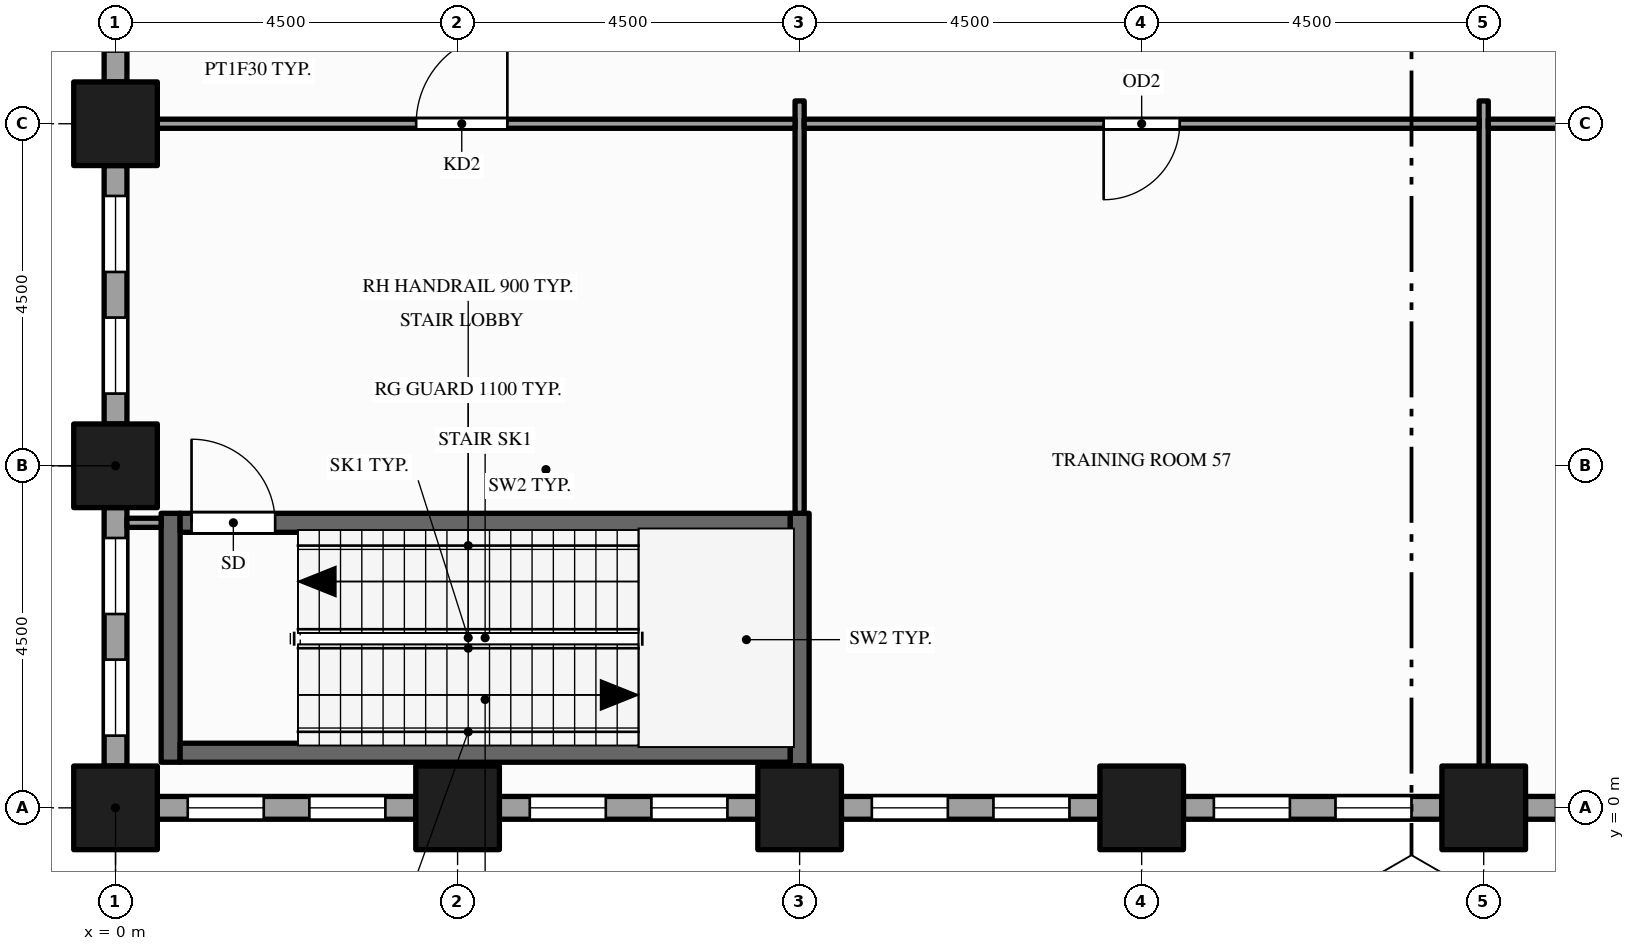
"""IFC4 building model, lengths in metres.
Left out: names, types, materials, properties, quantities, classifications, styles, units other than length and angle.
Written with IfcOpenShell. Run it as: python <this file> out.ifc"""

import sys

from ifc_helpers import new_model, si_unit, direction, frame, frame_2d, origin, origin_2d, place, context, subcontext, project, spatial, rectangle, hollow_rectangle, extrude, element, fill, save


model = new_model("IFC4")
c1 = context("Model", 3, precision=1e-05, world=origin(), true_north=direction((0.0, 1.0)))
c2 = subcontext(c1, "Body", "Model", "MODEL_VIEW")
j1 = project(units=[si_unit("LENGTHUNIT", "METRE"), si_unit("PLANEANGLEUNIT", "RADIAN")], contexts=[c1])
p1 = place(None, origin())
s1 = spatial("IfcSite", under=j1, at=p1, CompositionType="ELEMENT")
p2 = place(p1, origin())
s2 = spatial("IfcBuilding", under=s1, at=p2, CompositionType="ELEMENT")
p3 = place(p2, frame((0.0, 0.0, 8.0)))
s3 = spatial("IfcBuildingStorey", under=s2, at=p3, CompositionType="ELEMENT", Elevation=8.0)
for number, where, z_axis, x_axis in (
    (1, (0.0, 0.0, -0.25), (0.0, 0.0, 1.0), (1.0, 0.0, 0.0)),
    (2, (0.0, 4.5, -0.25), (0.0, 0.0, 1.0), (1.0, 0.0, 0.0)),
    (3, (0.0, 9.0, -0.25), (0.0, 0.0, 1.0), (1.0, 0.0, 0.0)),
    (4, (4.5, 0.0, -0.25), (0.0, 0.0, 1.0), (1.0, 0.0, 0.0)),
    (5, (9.0, 0.0, -0.25), (0.0, 0.0, 1.0), (1.0, 0.0, 0.0)),
    (6, (13.5, 0.0, -0.25), (0.0, 0.0, 1.0), (1.0, 0.0, 0.0)),
    (7, (18.0, 0.0, -0.25), (0.0, 0.0, 1.0), (1.0, 0.0, 0.0)),
):
    element("IfcColumn", number, at=place(p3, frame(where, z_axis=z_axis, x_axis=x_axis)), inside=s3, PredefinedType="COLUMN", context=c2, shape_type="SweptSolid", body=[
        extrude(hollow_rectangle(XDim=1.1, YDim=1.1, WallThickness=0.06, at=origin_2d()), origin(), (0.0, 0.0, 1.0), 6.0),
    ])
p4 = place(p3, frame((0.0, 12.95, 0.0), z_axis=(0.0, 0.0, 1.0), x_axis=(0.0, -1.0, 0.0)))
e8 = element("IfcWall", 8, at=p4, inside=s3, PredefinedType="STANDARD", context=c2, shape_type="SweptSolid", body=[
    extrude(rectangle(XDim=3.4, YDim=0.3, at=frame_2d((1.7, 0.0))), origin(), (0.0, 0.0, 1.0), 5.036),
])
p5 = place(p4, frame((0.4, 0.0, 0.9)))
e9 = element("IfcOpeningElement", 9, at=p5, cuts=e8, PredefinedType="OPENING", context=c2, shape_type="SweptSolid", body=[
    extrude(rectangle(XDim=1.0, YDim=3.5, at=frame_2d((0.5, 1.75))), frame((0.0, 0.16, 0.0), z_axis=(0.0, -1.0, 0.0), x_axis=(1.0, 0.0, 0.0)), (0.0, 0.0, 1.0), 0.32),
])
p6 = place(p4, frame((2.0, 0.0, 0.9)))
e10 = element("IfcOpeningElement", 10, at=p6, cuts=e8, PredefinedType="OPENING", context=c2, shape_type="SweptSolid", body=[
    extrude(rectangle(XDim=1.0, YDim=3.5, at=frame_2d((0.5, 1.75))), frame((0.0, 0.16, 0.0), z_axis=(0.0, -1.0, 0.0), x_axis=(1.0, 0.0, 0.0)), (0.0, 0.0, 1.0), 0.32),
])
p7 = place(p3, frame((0.0, 8.45, 0.0), z_axis=(0.0, 0.0, 1.0), x_axis=(0.0, -1.0, 0.0)))
e11 = element("IfcWall", 11, at=p7, inside=s3, PredefinedType="STANDARD", context=c2, shape_type="SweptSolid", body=[
    extrude(rectangle(XDim=3.4, YDim=0.3, at=frame_2d((1.7, 0.0))), origin(), (0.0, 0.0, 1.0), 5.036),
])
p8 = place(p7, frame((0.4, 0.0, 0.9)))
e12 = element("IfcOpeningElement", 12, at=p8, cuts=e11, PredefinedType="OPENING", context=c2, shape_type="SweptSolid", body=[
    extrude(rectangle(XDim=1.0, YDim=3.5, at=frame_2d((0.5, 1.75))), frame((0.0, 0.16, 0.0), z_axis=(0.0, -1.0, 0.0), x_axis=(1.0, 0.0, 0.0)), (0.0, 0.0, 1.0), 0.32),
])
p9 = place(p7, frame((2.0, 0.0, 0.9)))
e13 = element("IfcOpeningElement", 13, at=p9, cuts=e11, PredefinedType="OPENING", context=c2, shape_type="SweptSolid", body=[
    extrude(rectangle(XDim=1.0, YDim=3.5, at=frame_2d((0.5, 1.75))), frame((0.0, 0.16, 0.0), z_axis=(0.0, -1.0, 0.0), x_axis=(1.0, 0.0, 0.0)), (0.0, 0.0, 1.0), 0.32),
])
p10 = place(p3, frame((0.0, 3.95, 0.0), z_axis=(0.0, 0.0, 1.0), x_axis=(0.0, -1.0, 0.0)))
e14 = element("IfcWall", 14, at=p10, inside=s3, PredefinedType="STANDARD", context=c2, shape_type="SweptSolid", body=[
    extrude(rectangle(XDim=3.4, YDim=0.3, at=frame_2d((1.7, 0.0))), origin(), (0.0, 0.0, 1.0), 5.036),
])
p11 = place(p10, frame((0.4, 0.0, 0.9)))
e15 = element("IfcOpeningElement", 15, at=p11, cuts=e14, PredefinedType="OPENING", context=c2, shape_type="SweptSolid", body=[
    extrude(rectangle(XDim=1.0, YDim=3.5, at=frame_2d((0.5, 1.75))), frame((0.0, 0.16, 0.0), z_axis=(0.0, -1.0, 0.0), x_axis=(1.0, 0.0, 0.0)), (0.0, 0.0, 1.0), 0.32),
])
p12 = place(p10, frame((2.0, 0.0, 0.9)))
e16 = element("IfcOpeningElement", 16, at=p12, cuts=e14, PredefinedType="OPENING", context=c2, shape_type="SweptSolid", body=[
    extrude(rectangle(XDim=1.0, YDim=3.5, at=frame_2d((0.5, 1.75))), frame((0.0, 0.16, 0.0), z_axis=(0.0, -1.0, 0.0), x_axis=(1.0, 0.0, 0.0)), (0.0, 0.0, 1.0), 0.32),
])
p13 = place(p3, frame((0.55, 0.0, 0.0), z_axis=(0.0, 0.0, 1.0), x_axis=(1.0, 0.0, 0.0)))
e17 = element("IfcWall", 17, at=p13, inside=s3, PredefinedType="STANDARD", context=c2, shape_type="SweptSolid", body=[
    extrude(rectangle(XDim=3.4, YDim=0.3, at=frame_2d((1.7, 0.0))), origin(), (0.0, 0.0, 1.0), 5.036),
])
p14 = place(p13, frame((0.4, 0.0, 0.9)))
e18 = element("IfcOpeningElement", 18, at=p14, cuts=e17, PredefinedType="OPENING", context=c2, shape_type="SweptSolid", body=[
    extrude(rectangle(XDim=1.0, YDim=3.5, at=frame_2d((0.5, 1.75))), frame((0.0, 0.16, 0.0), z_axis=(0.0, -1.0, 0.0), x_axis=(1.0, 0.0, 0.0)), (0.0, 0.0, 1.0), 0.32),
])
p15 = place(p13, frame((2.0, 0.0, 0.9)))
e19 = element("IfcOpeningElement", 19, at=p15, cuts=e17, PredefinedType="OPENING", context=c2, shape_type="SweptSolid", body=[
    extrude(rectangle(XDim=1.0, YDim=3.5, at=frame_2d((0.5, 1.75))), frame((0.0, 0.16, 0.0), z_axis=(0.0, -1.0, 0.0), x_axis=(1.0, 0.0, 0.0)), (0.0, 0.0, 1.0), 0.32),
])
p16 = place(p3, frame((5.05, 0.0, 0.0), z_axis=(0.0, 0.0, 1.0), x_axis=(1.0, 0.0, 0.0)))
e20 = element("IfcWall", 20, at=p16, inside=s3, PredefinedType="STANDARD", context=c2, shape_type="SweptSolid", body=[
    extrude(rectangle(XDim=3.4, YDim=0.3, at=frame_2d((1.7, 0.0))), origin(), (0.0, 0.0, 1.0), 5.036),
])
p17 = place(p16, frame((0.4, 0.0, 0.9)))
e21 = element("IfcOpeningElement", 21, at=p17, cuts=e20, PredefinedType="OPENING", context=c2, shape_type="SweptSolid", body=[
    extrude(rectangle(XDim=1.0, YDim=3.5, at=frame_2d((0.5, 1.75))), frame((0.0, 0.16, 0.0), z_axis=(0.0, -1.0, 0.0), x_axis=(1.0, 0.0, 0.0)), (0.0, 0.0, 1.0), 0.32),
])
p18 = place(p16, frame((2.0, 0.0, 0.9)))
e22 = element("IfcOpeningElement", 22, at=p18, cuts=e20, PredefinedType="OPENING", context=c2, shape_type="SweptSolid", body=[
    extrude(rectangle(XDim=1.0, YDim=3.5, at=frame_2d((0.5, 1.75))), frame((0.0, 0.16, 0.0), z_axis=(0.0, -1.0, 0.0), x_axis=(1.0, 0.0, 0.0)), (0.0, 0.0, 1.0), 0.32),
])
p19 = place(p3, frame((9.55, 0.0, 0.0), z_axis=(0.0, 0.0, 1.0), x_axis=(1.0, 0.0, 0.0)))
e23 = element("IfcWall", 23, at=p19, inside=s3, PredefinedType="STANDARD", context=c2, shape_type="SweptSolid", body=[
    extrude(rectangle(XDim=3.4, YDim=0.3, at=frame_2d((1.7, 0.0))), origin(), (0.0, 0.0, 1.0), 5.036),
])
p20 = place(p19, frame((0.4, 0.0, 0.9)))
e24 = element("IfcOpeningElement", 24, at=p20, cuts=e23, PredefinedType="OPENING", context=c2, shape_type="SweptSolid", body=[
    extrude(rectangle(XDim=1.0, YDim=3.5, at=frame_2d((0.5, 1.75))), frame((0.0, 0.16, 0.0), z_axis=(0.0, -1.0, 0.0), x_axis=(1.0, 0.0, 0.0)), (0.0, 0.0, 1.0), 0.32),
])
p21 = place(p19, frame((2.0, 0.0, 0.9)))
e25 = element("IfcOpeningElement", 25, at=p21, cuts=e23, PredefinedType="OPENING", context=c2, shape_type="SweptSolid", body=[
    extrude(rectangle(XDim=1.0, YDim=3.5, at=frame_2d((0.5, 1.75))), frame((0.0, 0.16, 0.0), z_axis=(0.0, -1.0, 0.0), x_axis=(1.0, 0.0, 0.0)), (0.0, 0.0, 1.0), 0.32),
])
p22 = place(p3, frame((14.05, 0.0, 0.0), z_axis=(0.0, 0.0, 1.0), x_axis=(1.0, 0.0, 0.0)))
e26 = element("IfcWall", 26, at=p22, inside=s3, PredefinedType="STANDARD", context=c2, shape_type="SweptSolid", body=[
    extrude(rectangle(XDim=3.4, YDim=0.3, at=frame_2d((1.7, 0.0))), origin(), (0.0, 0.0, 1.0), 5.036),
])
p23 = place(p22, frame((0.4, 0.0, 0.9)))
e27 = element("IfcOpeningElement", 27, at=p23, cuts=e26, PredefinedType="OPENING", context=c2, shape_type="SweptSolid", body=[
    extrude(rectangle(XDim=1.0, YDim=3.5, at=frame_2d((0.5, 1.75))), frame((0.0, 0.16, 0.0), z_axis=(0.0, -1.0, 0.0), x_axis=(1.0, 0.0, 0.0)), (0.0, 0.0, 1.0), 0.32),
])
p24 = place(p22, frame((2.0, 0.0, 0.9)))
e28 = element("IfcOpeningElement", 28, at=p24, cuts=e26, PredefinedType="OPENING", context=c2, shape_type="SweptSolid", body=[
    extrude(rectangle(XDim=1.0, YDim=3.5, at=frame_2d((0.5, 1.75))), frame((0.0, 0.16, 0.0), z_axis=(0.0, -1.0, 0.0), x_axis=(1.0, 0.0, 0.0)), (0.0, 0.0, 1.0), 0.32),
])
p25 = place(p3, frame((18.55, 0.0, 0.0), z_axis=(0.0, 0.0, 1.0), x_axis=(1.0, 0.0, 0.0)))
e29 = element("IfcWall", 29, at=p25, inside=s3, PredefinedType="STANDARD", context=c2, shape_type="SweptSolid", body=[
    extrude(rectangle(XDim=3.4, YDim=0.3, at=frame_2d((1.7, 0.0))), origin(), (0.0, 0.0, 1.0), 5.036),
])
p26 = place(p25, frame((0.4, 0.0, 0.9)))
e30 = element("IfcOpeningElement", 30, at=p26, cuts=e29, PredefinedType="OPENING", context=c2, shape_type="SweptSolid", body=[
    extrude(rectangle(XDim=1.0, YDim=3.5, at=frame_2d((0.5, 1.75))), frame((0.0, 0.16, 0.0), z_axis=(0.0, -1.0, 0.0), x_axis=(1.0, 0.0, 0.0)), (0.0, 0.0, 1.0), 0.32),
])
p27 = place(p25, frame((2.0, 0.0, 0.9)))
e31 = element("IfcOpeningElement", 31, at=p27, cuts=e29, PredefinedType="OPENING", context=c2, shape_type="SweptSolid", body=[
    extrude(rectangle(XDim=1.0, YDim=3.5, at=frame_2d((0.5, 1.75))), frame((0.0, 0.16, 0.0), z_axis=(0.0, -1.0, 0.0), x_axis=(1.0, 0.0, 0.0)), (0.0, 0.0, 1.0), 0.32),
])
p28 = place(p3, frame((0.725, 0.6, 0.0), z_axis=(0.0, 0.0, 1.0), x_axis=(0.0, 1.0, 0.0)))
e32 = element("IfcWall", 32, at=p28, inside=s3, PredefinedType="SHEAR", context=c2, shape_type="SweptSolid", body=[
    extrude(rectangle(XDim=3.275, YDim=0.25, at=frame_2d((1.637, 0.0))), origin(), (0.0, 0.0, 1.0), 5.75),
])
p29 = place(p3, frame((9.0, 0.15, 0.0), z_axis=(0.0, 0.0, 1.0), x_axis=(0.0, 1.0, 0.0)))
e33 = element("IfcWall", 33, at=p29, inside=s3, PredefinedType="PARTITIONING", context=c2, shape_type="SweptSolid", body=[
    extrude(rectangle(XDim=0.4, YDim=0.12, at=frame_2d((0.2, 0.0))), origin(), (0.0, 0.0, 1.0), 5.75),
])
p30 = place(p3, frame((9.0, 0.55, 0.0), z_axis=(0.0, 0.0, 1.0), x_axis=(0.0, 1.0, 0.0)))
e34 = element("IfcWall", 34, at=p30, inside=s3, PredefinedType="SHEAR", context=c2, shape_type="SweptSolid", body=[
    extrude(rectangle(XDim=3.325, YDim=0.25, at=frame_2d((1.663, 0.0))), origin(), (0.0, 0.0, 1.0), 5.75),
])
p31 = place(p3, frame((9.0, 3.875, 0.0), z_axis=(0.0, 0.0, 1.0), x_axis=(0.0, 1.0, 0.0)))
e35 = element("IfcWall", 35, at=p31, inside=s3, PredefinedType="PARTITIONING", context=c2, shape_type="SweptSolid", body=[
    extrude(rectangle(XDim=5.425, YDim=0.12, at=frame_2d((2.712, 0.0))), origin(), (0.0, 0.0, 1.0), 4.759),
])
p32 = place(p3, frame((18.0, 0.15, 0.0), z_axis=(0.0, 0.0, 1.0), x_axis=(0.0, 1.0, 0.0)))
e36 = element("IfcWall", 36, at=p32, inside=s3, PredefinedType="PARTITIONING", context=c2, shape_type="SweptSolid", body=[
    extrude(rectangle(XDim=9.15, YDim=0.12, at=frame_2d((4.575, 0.0))), origin(), (0.0, 0.0, 1.0), 4.759),
])
p33 = place(p3, frame((0.85, 0.725, 0.0), z_axis=(0.0, 0.0, 1.0), x_axis=(1.0, 0.0, 0.0)))
e37 = element("IfcWall", 37, at=p33, inside=s3, PredefinedType="SHEAR", context=c2, shape_type="SweptSolid", body=[
    extrude(rectangle(XDim=8.025, YDim=0.25, at=frame_2d((4.012, 0.0))), origin(), (0.0, 0.0, 1.0), 5.75),
])
p34 = place(p3, frame((0.15, 3.75, 0.0), z_axis=(0.0, 0.0, 1.0), x_axis=(1.0, 0.0, 0.0)))
e38 = element("IfcWall", 38, at=p34, inside=s3, PredefinedType="PARTITIONING", context=c2, shape_type="SweptSolid", body=[
    extrude(rectangle(XDim=0.45, YDim=0.12, at=frame_2d((0.225, 0.0))), origin(), (0.0, 0.0, 1.0), 5.036),
])
p35 = place(p3, frame((0.85, 3.75, 0.0), z_axis=(0.0, 0.0, 1.0), x_axis=(1.0, 0.0, 0.0)))
e39 = element("IfcWall", 39, at=p35, inside=s3, PredefinedType="SHEAR", context=c2, shape_type="SweptSolid", body=[
    extrude(rectangle(XDim=8.025, YDim=0.25, at=frame_2d((4.012, 0.0))), origin(), (0.0, 0.0, 1.0), 5.75),
])
p36 = place(p35, frame((0.15, 0.0, 0.0)))
e40 = element("IfcOpeningElement", 40, at=p36, cuts=e39, PredefinedType="OPENING", context=c2, shape_type="SweptSolid", body=[
    extrude(rectangle(XDim=1.1, YDim=2.1, at=frame_2d((0.55, 1.05))), frame((0.0, 0.135, 0.0), z_axis=(0.0, -1.0, 0.0), x_axis=(1.0, 0.0, 0.0)), (0.0, 0.0, 1.0), 0.27),
])
p37 = place(p3, frame((0.15, 9.0, 0.0), z_axis=(0.0, 0.0, 1.0), x_axis=(1.0, 0.0, 0.0)))
e41 = element("IfcWall", 41, at=p37, inside=s3, PredefinedType="PARTITIONING", context=c2, shape_type="SweptSolid", body=[
    extrude(rectangle(XDim=8.79, YDim=0.12, at=frame_2d((4.395, 0.0))), origin(), (0.0, 0.0, 1.0), 4.759),
])
p38 = place(p37, frame((3.805, 0.0, 0.0)))
e42 = element("IfcOpeningElement", 42, at=p38, cuts=e41, PredefinedType="OPENING", context=c2, shape_type="SweptSolid", body=[
    extrude(rectangle(XDim=1.2, YDim=2.1, at=frame_2d((0.6, 1.05))), frame((0.0, 0.07, 0.0), z_axis=(0.0, -1.0, 0.0), x_axis=(1.0, 0.0, 0.0)), (0.0, 0.0, 1.0), 0.14),
])
p39 = place(p3, frame((9.06, 9.0, 0.0), z_axis=(0.0, 0.0, 1.0), x_axis=(1.0, 0.0, 0.0)))
e43 = element("IfcWall", 43, at=p39, inside=s3, PredefinedType="PARTITIONING", context=c2, shape_type="SweptSolid", body=[
    extrude(rectangle(XDim=8.88, YDim=0.12, at=frame_2d((4.44, 0.0))), origin(), (0.0, 0.0, 1.0), 4.759),
])
p40 = place(p39, frame((3.94, 0.0, 0.0)))
e44 = element("IfcOpeningElement", 44, at=p40, cuts=e43, PredefinedType="OPENING", context=c2, shape_type="SweptSolid", body=[
    extrude(rectangle(XDim=1.0, YDim=2.1, at=frame_2d((0.5, 1.05))), frame((0.0, 0.07, 0.0), z_axis=(0.0, -1.0, 0.0), x_axis=(1.0, 0.0, 0.0)), (0.0, 0.0, 1.0), 0.14),
])
p41 = place(p3, frame((18.06, 9.0, 0.0), z_axis=(0.0, 0.0, 1.0), x_axis=(1.0, 0.0, 0.0)))
e45 = element("IfcWall", 45, at=p41, inside=s3, PredefinedType="PARTITIONING", context=c2, shape_type="SweptSolid", body=[
    extrude(rectangle(XDim=4.38, YDim=0.12, at=frame_2d((2.19, 0.0))), origin(), (0.0, 0.0, 1.0), 4.759),
])
p42 = place(p41, frame((1.69, 0.0, 0.0)))
e46 = element("IfcOpeningElement", 46, at=p42, cuts=e45, PredefinedType="OPENING", context=c2, shape_type="SweptSolid", body=[
    extrude(rectangle(XDim=1.0, YDim=2.1, at=frame_2d((0.5, 1.05))), frame((0.0, 0.07, 0.0), z_axis=(0.0, -1.0, 0.0), x_axis=(1.0, 0.0, 0.0)), (0.0, 0.0, 1.0), 0.14),
])
p43 = place(p8, origin())
e47 = element("IfcWindow", 47, at=p43, inside=s3, PartitioningType="SINGLE_PANEL", PredefinedType="WINDOW", context=c2, shape_type="SweptSolid", body=[
    extrude(rectangle(XDim=1.0, YDim=3.5, at=frame_2d((0.5, 1.75))), frame((0.0, 0.03, 0.0), z_axis=(0.0, -1.0, 0.0), x_axis=(1.0, 0.0, 0.0)), (0.0, 0.0, 1.0), 0.06),
])
fill(e12, e47)
p44 = place(p9, origin())
e48 = element("IfcWindow", 48, at=p44, inside=s3, PartitioningType="SINGLE_PANEL", PredefinedType="WINDOW", context=c2, shape_type="SweptSolid", body=[
    extrude(rectangle(XDim=1.0, YDim=3.5, at=frame_2d((0.5, 1.75))), frame((0.0, 0.03, 0.0), z_axis=(0.0, -1.0, 0.0), x_axis=(1.0, 0.0, 0.0)), (0.0, 0.0, 1.0), 0.06),
])
fill(e13, e48)
p45 = place(p11, origin())
e49 = element("IfcWindow", 49, at=p45, inside=s3, PartitioningType="SINGLE_PANEL", PredefinedType="WINDOW", context=c2, shape_type="SweptSolid", body=[
    extrude(rectangle(XDim=1.0, YDim=3.5, at=frame_2d((0.5, 1.75))), frame((0.0, 0.03, 0.0), z_axis=(0.0, -1.0, 0.0), x_axis=(1.0, 0.0, 0.0)), (0.0, 0.0, 1.0), 0.06),
])
fill(e15, e49)
p46 = place(p12, origin())
e50 = element("IfcWindow", 50, at=p46, inside=s3, PartitioningType="SINGLE_PANEL", PredefinedType="WINDOW", context=c2, shape_type="SweptSolid", body=[
    extrude(rectangle(XDim=1.0, YDim=3.5, at=frame_2d((0.5, 1.75))), frame((0.0, 0.03, 0.0), z_axis=(0.0, -1.0, 0.0), x_axis=(1.0, 0.0, 0.0)), (0.0, 0.0, 1.0), 0.06),
])
fill(e16, e50)
p47 = place(p14, origin())
e51 = element("IfcWindow", 51, at=p47, inside=s3, PartitioningType="SINGLE_PANEL", PredefinedType="WINDOW", context=c2, shape_type="SweptSolid", body=[
    extrude(rectangle(XDim=1.0, YDim=3.5, at=frame_2d((0.5, 1.75))), frame((0.0, 0.03, 0.0), z_axis=(0.0, -1.0, 0.0), x_axis=(1.0, 0.0, 0.0)), (0.0, 0.0, 1.0), 0.06),
])
fill(e18, e51)
p48 = place(p15, origin())
e52 = element("IfcWindow", 52, at=p48, inside=s3, PartitioningType="SINGLE_PANEL", PredefinedType="WINDOW", context=c2, shape_type="SweptSolid", body=[
    extrude(rectangle(XDim=1.0, YDim=3.5, at=frame_2d((0.5, 1.75))), frame((0.0, 0.03, 0.0), z_axis=(0.0, -1.0, 0.0), x_axis=(1.0, 0.0, 0.0)), (0.0, 0.0, 1.0), 0.06),
])
fill(e19, e52)
p49 = place(p17, origin())
e53 = element("IfcWindow", 53, at=p49, inside=s3, PartitioningType="SINGLE_PANEL", PredefinedType="WINDOW", context=c2, shape_type="SweptSolid", body=[
    extrude(rectangle(XDim=1.0, YDim=3.5, at=frame_2d((0.5, 1.75))), frame((0.0, 0.03, 0.0), z_axis=(0.0, -1.0, 0.0), x_axis=(1.0, 0.0, 0.0)), (0.0, 0.0, 1.0), 0.06),
])
fill(e21, e53)
p50 = place(p18, origin())
e54 = element("IfcWindow", 54, at=p50, inside=s3, PartitioningType="SINGLE_PANEL", PredefinedType="WINDOW", context=c2, shape_type="SweptSolid", body=[
    extrude(rectangle(XDim=1.0, YDim=3.5, at=frame_2d((0.5, 1.75))), frame((0.0, 0.03, 0.0), z_axis=(0.0, -1.0, 0.0), x_axis=(1.0, 0.0, 0.0)), (0.0, 0.0, 1.0), 0.06),
])
fill(e22, e54)
p51 = place(p20, origin())
e55 = element("IfcWindow", 55, at=p51, inside=s3, PartitioningType="SINGLE_PANEL", PredefinedType="WINDOW", context=c2, shape_type="SweptSolid", body=[
    extrude(rectangle(XDim=1.0, YDim=3.5, at=frame_2d((0.5, 1.75))), frame((0.0, 0.03, 0.0), z_axis=(0.0, -1.0, 0.0), x_axis=(1.0, 0.0, 0.0)), (0.0, 0.0, 1.0), 0.06),
])
fill(e24, e55)
p52 = place(p21, origin())
e56 = element("IfcWindow", 56, at=p52, inside=s3, PartitioningType="SINGLE_PANEL", PredefinedType="WINDOW", context=c2, shape_type="SweptSolid", body=[
    extrude(rectangle(XDim=1.0, YDim=3.5, at=frame_2d((0.5, 1.75))), frame((0.0, 0.03, 0.0), z_axis=(0.0, -1.0, 0.0), x_axis=(1.0, 0.0, 0.0)), (0.0, 0.0, 1.0), 0.06),
])
fill(e25, e56)
p53 = place(p23, origin())
e57 = element("IfcWindow", 57, at=p53, inside=s3, PartitioningType="SINGLE_PANEL", PredefinedType="WINDOW", context=c2, shape_type="SweptSolid", body=[
    extrude(rectangle(XDim=1.0, YDim=3.5, at=frame_2d((0.5, 1.75))), frame((0.0, 0.03, 0.0), z_axis=(0.0, -1.0, 0.0), x_axis=(1.0, 0.0, 0.0)), (0.0, 0.0, 1.0), 0.06),
])
fill(e27, e57)
p54 = place(p24, origin())
e58 = element("IfcWindow", 58, at=p54, inside=s3, PartitioningType="SINGLE_PANEL", PredefinedType="WINDOW", context=c2, shape_type="SweptSolid", body=[
    extrude(rectangle(XDim=1.0, YDim=3.5, at=frame_2d((0.5, 1.75))), frame((0.0, 0.03, 0.0), z_axis=(0.0, -1.0, 0.0), x_axis=(1.0, 0.0, 0.0)), (0.0, 0.0, 1.0), 0.06),
])
fill(e28, e58)
p55 = place(p36, origin())
e59 = element("IfcDoor", 59, at=p55, inside=s3, OperationType="SINGLE_SWING_LEFT", PredefinedType="DOOR", context=c2, shape_type="SweptSolid", body=[
    extrude(rectangle(XDim=1.1, YDim=2.1, at=frame_2d((0.55, 1.05))), frame((0.0, 0.025, 0.0), z_axis=(0.0, -1.0, 0.0), x_axis=(1.0, 0.0, 0.0)), (0.0, 0.0, 1.0), 0.05),
])
fill(e40, e59)
p56 = place(p38, origin())
e60 = element("IfcDoor", 60, at=p56, inside=s3, OperationType="SINGLE_SWING_RIGHT", PredefinedType="DOOR", context=c2, shape_type="SweptSolid", body=[
    extrude(rectangle(XDim=1.2, YDim=2.1, at=frame_2d((0.6, 1.05))), frame((0.0, 0.025, 0.0), z_axis=(0.0, -1.0, 0.0), x_axis=(1.0, 0.0, 0.0)), (0.0, 0.0, 1.0), 0.05),
])
fill(e42, e60)
p57 = place(p40, origin())
e61 = element("IfcDoor", 61, at=p57, inside=s3, OperationType="SINGLE_SWING_LEFT", PredefinedType="DOOR", context=c2, shape_type="SweptSolid", body=[
    extrude(rectangle(XDim=1.0, YDim=2.1, at=frame_2d((0.5, 1.05))), frame((0.0, 0.025, 0.0), z_axis=(0.0, -1.0, 0.0), x_axis=(1.0, 0.0, 0.0)), (0.0, 0.0, 1.0), 0.05),
])
fill(e44, e61)
save(model, sys.argv[1])
